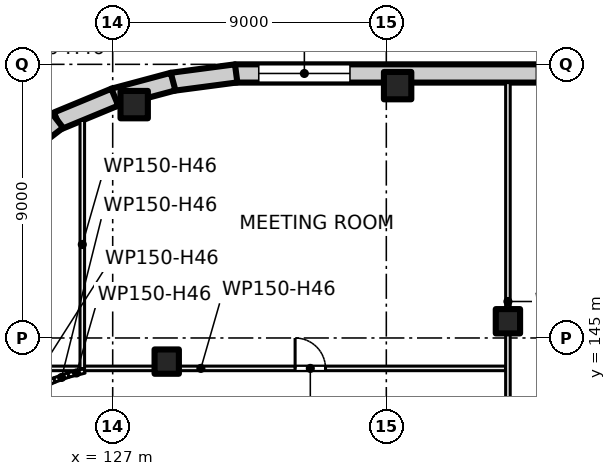
"""IFC4 building model, lengths in metres.
Left out: names, types, materials, properties, quantities, classifications, styles, units other than length and angle.
Written with IfcOpenShell. Run it as: python <this file> out.ifc"""

import sys

from ifc_helpers import new_model, si_unit, direction, frame, frame_2d, origin, origin_2d, place, context, subcontext, project, spatial, rectangle, extrude, element, fill, save


model = new_model("IFC4")
c1 = context("Model", 3, precision=1e-05, world=origin(), true_north=direction((0.0, 1.0)))
c2 = subcontext(c1, "Body", "Model", "MODEL_VIEW")
j1 = project(units=[si_unit("LENGTHUNIT", "METRE"), si_unit("PLANEANGLEUNIT", "RADIAN")], contexts=[c1])
p1 = place(None, origin())
s1 = spatial("IfcSite", under=j1, at=p1, CompositionType="ELEMENT")
p2 = place(p1, origin())
s2 = spatial("IfcBuilding", under=s1, at=p2, CompositionType="ELEMENT")
p3 = place(p2, frame((0.0, 0.0, 7.5)))
s3 = spatial("IfcBuildingStorey", under=s2, at=p3, CompositionType="ELEMENT", Elevation=7.5)
for number, where, z_axis, x_axis in (
    (1, (127.707, 152.675, 0.0), (0.0, 0.0, 1.0), (1.0, 0.0, 0.0)),
    (2, (136.372, 153.3, 0.0), (0.0, 0.0, 1.0), (1.0, 0.0, 0.0)),
):
    element("IfcColumn", number, at=place(p3, frame(where, z_axis=z_axis, x_axis=x_axis)), inside=s3, PredefinedType="COLUMN", context=c2, shape_type="SweptSolid", body=[
        extrude(rectangle(XDim=0.9, YDim=0.9, at=origin_2d()), origin(), (0.0, 0.0, 1.0), 5.0),
    ])
for number, where, z_axis, x_axis in (
    (3, (128.777, 144.223, 0.0), (0.0, 0.0, 1.0), (1.0, 0.0, 0.0)),
    (4, (140.0, 145.55, 0.0), (0.0, 0.0, 1.0), (1.0, 0.0, 0.0)),
):
    element("IfcColumn", number, at=place(p3, frame(where, z_axis=z_axis, x_axis=x_axis)), inside=s3, PredefinedType="COLUMN", context=c2, shape_type="SweptSolid", body=[
        extrude(rectangle(XDim=0.8, YDim=0.8, at=origin_2d()), origin(), (0.0, 0.0, 1.0), 5.0),
    ])
p4 = place(p3, frame((131.022, 153.7, 0.0), z_axis=(0.0, 0.0, 1.0), x_axis=(1.0, 0.0, 0.0)))
e5 = element("IfcWall", 5, at=p4, inside=s3, PredefinedType="SOLIDWALL", context=c2, shape_type="SweptSolid", body=[
    extrude(rectangle(XDim=31.957, YDim=0.6, at=frame_2d((15.978, 0.0))), origin(), (0.0, 0.0, 1.0), 4.6),
])
p5 = place(p4, frame((0.783, 0.0, 0.9)))
e6 = element("IfcOpeningElement", 6, at=p5, cuts=e5, PredefinedType="OPENING", context=c2, shape_type="SweptSolid", body=[
    extrude(rectangle(XDim=3.0, YDim=3.0, at=frame_2d((1.5, 1.5))), frame((0.0, 0.31, 0.0), z_axis=(0.0, -1.0, 0.0), x_axis=(1.0, 0.0, 0.0)), (0.0, 0.0, 1.0), 0.62),
])
p6 = place(p4, frame((9.913, 0.0, 0.9)))
e7 = element("IfcOpeningElement", 7, at=p6, cuts=e5, PredefinedType="OPENING", context=c2, shape_type="SweptSolid", body=[
    extrude(rectangle(XDim=3.0, YDim=3.0, at=frame_2d((1.5, 1.5))), frame((0.0, 0.31, 0.0), z_axis=(0.0, -1.0, 0.0), x_axis=(1.0, 0.0, 0.0)), (0.0, 0.0, 1.0), 0.62),
])
p7 = place(p4, frame((14.928, 0.0, 0.9)))
e8 = element("IfcOpeningElement", 8, at=p7, cuts=e5, PredefinedType="OPENING", context=c2, shape_type="SweptSolid", body=[
    extrude(rectangle(XDim=3.0, YDim=3.0, at=frame_2d((1.5, 1.5))), frame((0.0, 0.31, 0.0), z_axis=(0.0, -1.0, 0.0), x_axis=(1.0, 0.0, 0.0)), (0.0, 0.0, 1.0), 0.62),
])
p8 = place(p4, frame((19.043, 0.0, 0.9)))
e9 = element("IfcOpeningElement", 9, at=p8, cuts=e5, PredefinedType="OPENING", context=c2, shape_type="SweptSolid", body=[
    extrude(rectangle(XDim=3.0, YDim=3.0, at=frame_2d((1.5, 1.5))), frame((0.0, 0.31, 0.0), z_axis=(0.0, -1.0, 0.0), x_axis=(1.0, 0.0, 0.0)), (0.0, 0.0, 1.0), 0.62),
])
p9 = place(p4, frame((23.609, 0.0, 0.9)))
e10 = element("IfcOpeningElement", 10, at=p9, cuts=e5, PredefinedType="OPENING", context=c2, shape_type="SweptSolid", body=[
    extrude(rectangle(XDim=3.0, YDim=3.0, at=frame_2d((1.5, 1.5))), frame((0.0, 0.31, 0.0), z_axis=(0.0, -1.0, 0.0), x_axis=(1.0, 0.0, 0.0)), (0.0, 0.0, 1.0), 0.62),
])
p10 = place(p4, frame((27.724, 0.0, 0.9)))
e11 = element("IfcOpeningElement", 11, at=p10, cuts=e5, PredefinedType="OPENING", context=c2, shape_type="SweptSolid", body=[
    extrude(rectangle(XDim=3.0, YDim=3.0, at=frame_2d((1.5, 1.5))), frame((0.0, 0.31, 0.0), z_axis=(0.0, -1.0, 0.0), x_axis=(1.0, 0.0, 0.0)), (0.0, 0.0, 1.0), 0.62),
])
p11 = place(p3, frame((128.948, 153.424, 0.0), z_axis=(0.0, 0.0, 1.0), x_axis=(0.991440646942, 0.130558200013, 0.0)))
e12 = element("IfcWall", 12, at=p11, inside=s3, PredefinedType="SOLIDWALL", context=c2, shape_type="SweptSolid", body=[
    extrude(rectangle(XDim=2.132, YDim=0.6, at=frame_2d((1.066, 0.0))), origin(), (0.0, 0.0, 1.0), 4.6),
])
p12 = place(p3, frame((127.032, 152.908, 0.0), z_axis=(0.0, 0.0, 1.0), x_axis=(0.965929732323, 0.258804467146, 0.0)))
e13 = element("IfcWall", 13, at=p12, inside=s3, PredefinedType="SOLIDWALL", context=c2, shape_type="SweptSolid", body=[
    extrude(rectangle(XDim=2.022, YDim=0.6, at=frame_2d((1.011, 0.0))), origin(), (0.0, 0.0, 1.0), 4.6),
])
p13 = place(p3, frame((125.181, 152.14, 0.0), z_axis=(0.0, 0.0, 1.0), x_axis=(0.924021197839, 0.382341242798, 0.0)))
e14 = element("IfcWall", 14, at=p13, inside=s3, PredefinedType="SOLIDWALL", context=c2, shape_type="SweptSolid", body=[
    extrude(rectangle(XDim=2.044, YDim=0.6, at=frame_2d((1.022, 0.0))), origin(), (0.0, 0.0, 1.0), 4.6),
])
p14 = place(p3, frame((123.507, 150.865, 0.0), z_axis=(0.0, 0.0, 1.0), x_axis=(0.79313029079, 0.609052002567, 0.0)))
e15 = element("IfcWall", 15, at=p14, inside=s3, PredefinedType="SOLIDWALL", context=c2, shape_type="SweptSolid", body=[
    extrude(rectangle(XDim=2.114, YDim=0.6, at=frame_2d((1.057, 0.0))), origin(), (0.0, 0.0, 1.0), 4.6),
])
p15 = place(p3, frame((119.875, 144.0, 0.0), z_axis=(0.0, 0.0, 1.0), x_axis=(1.0, 0.0, 0.0)))
e16 = element("IfcWall", 16, at=p15, inside=s3, PredefinedType="PARTITIONING", context=c2, shape_type="SweptSolid", body=[
    extrude(rectangle(XDim=20.05, YDim=0.15, at=frame_2d((10.025, 0.0))), origin(), (0.0, 0.0, 1.0), 4.6),
])
p16 = place(p15, frame((13.125, 0.0, 0.0)))
e17 = element("IfcOpeningElement", 17, at=p16, cuts=e16, PredefinedType="OPENING", context=c2, shape_type="SweptSolid", body=[
    extrude(rectangle(XDim=1.0, YDim=2.1, at=frame_2d((0.5, 1.05))), frame((0.0, 0.085, 0.0), z_axis=(0.0, -1.0, 0.0), x_axis=(1.0, 0.0, 0.0)), (0.0, 0.0, 1.0), 0.17),
])
for number, where, z_axis, x_axis in (
    (18, (124.64, 143.408, 0.0), (0.0, 0.0, 1.0), (0.904, 0.428, 0.0)),
    (19, (125.084, 143.618, 0.0), (0.0, 0.0, 1.0), (0.941, 0.337, 0.0)),
):
    element("IfcWall", number, at=place(p3, frame(where, z_axis=z_axis, x_axis=x_axis)), inside=s3, PredefinedType="PARTITIONING", context=c2, shape_type="SweptSolid", body=[
        extrude(rectangle(XDim=0.498, YDim=0.15, at=frame_2d((0.249, 0.0))), origin(), (0.0, 0.0, 1.0), 4.6),
    ])
p17 = place(p3, frame((125.545, 143.784, 0.0), z_axis=(0.0, 0.0, 1.0), x_axis=(0.970116111764, 0.242641154168, 0.0)))
e20 = element("IfcWall", 20, at=p17, inside=s3, PredefinedType="PARTITIONING", context=c2, shape_type="SweptSolid", body=[
    extrude(rectangle(XDim=0.544, YDim=0.15, at=frame_2d((0.272, 0.0))), origin(), (0.0, 0.0, 1.0), 4.6),
])
p18 = place(p3, frame((126.0, 143.995, 0.0), z_axis=(0.0, 0.0, 1.0), x_axis=(0.0, 1.0, 0.0)))
e21 = element("IfcWall", 21, at=p18, inside=s3, PredefinedType="PARTITIONING", context=c2, shape_type="SweptSolid", body=[
    extrude(rectangle(XDim=8.159, YDim=0.15, at=frame_2d((4.08, 0.0))), origin(), (0.0, 0.0, 1.0), 4.6),
])
p19 = place(p3, frame((140.0, 139.0, 0.0), z_axis=(0.0, 0.0, 1.0), x_axis=(0.0, 1.0, 0.0)))
e22 = element("IfcWall", 22, at=p19, inside=s3, PredefinedType="PARTITIONING", context=c2, shape_type="SweptSolid", body=[
    extrude(rectangle(XDim=14.4, YDim=0.15, at=frame_2d((7.2, 0.0))), origin(), (0.0, 0.0, 1.0), 4.6),
])
p20 = place(p5, origin())
e23 = element("IfcWindow", 23, at=p20, inside=s3, PartitioningType="SINGLE_PANEL", PredefinedType="WINDOW", context=c2, shape_type="SweptSolid", body=[
    extrude(rectangle(XDim=3.0, YDim=3.0, at=frame_2d((1.5, 1.5))), frame((0.0, 0.03, 0.0), z_axis=(0.0, -1.0, 0.0), x_axis=(1.0, 0.0, 0.0)), (0.0, 0.0, 1.0), 0.06),
])
fill(e6, e23)
p21 = place(p16, origin())
e24 = element("IfcDoor", 24, at=p21, inside=s3, OperationType="SINGLE_SWING_LEFT", PredefinedType="DOOR", context=c2, shape_type="SweptSolid", body=[
    extrude(rectangle(XDim=1.0, YDim=2.1, at=frame_2d((0.5, 1.05))), frame((0.0, 0.025, 0.0), z_axis=(0.0, -1.0, 0.0), x_axis=(1.0, 0.0, 0.0)), (0.0, 0.0, 1.0), 0.05),
])
fill(e17, e24)
save(model, sys.argv[1])
